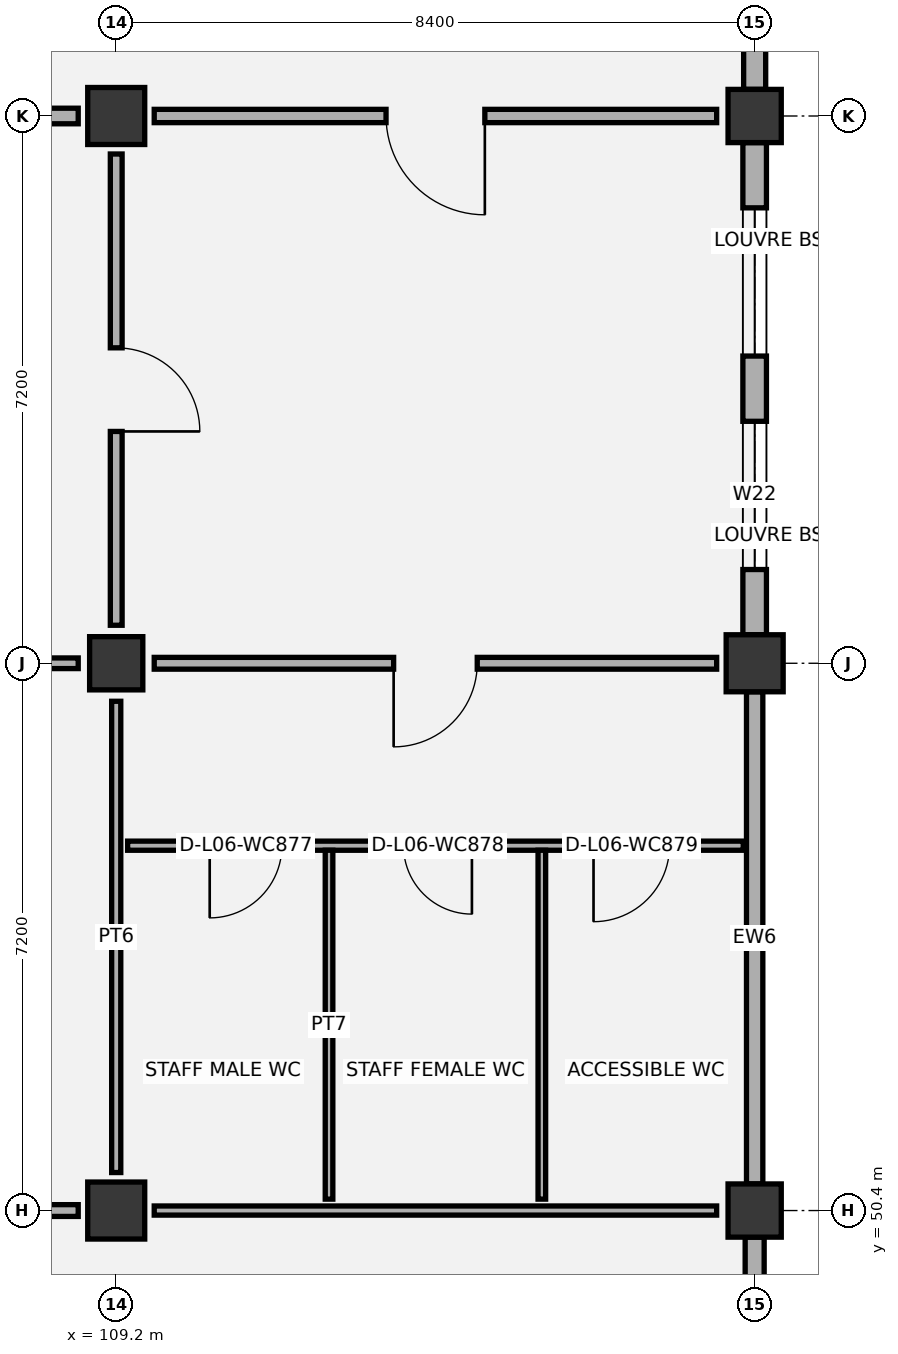
"""IFC4 building model, lengths in metres.
Left out: names, types, materials, properties, quantities, classifications, styles, units other than length and angle.
Written with IfcOpenShell. Run it as: python <this file> out.ifc"""

import sys

from ifc_helpers import new_model, si_unit, direction, frame, frame_2d, origin, origin_2d, place, context, subcontext, project, spatial, rectangle, extrude, element, fill, save


model = new_model("IFC4")
c1 = context("Model", 3, precision=1e-05, world=origin(), true_north=direction((0.0, 1.0)))
c2 = subcontext(c1, "Body", "Model", "MODEL_VIEW")
j1 = project(units=[si_unit("LENGTHUNIT", "METRE"), si_unit("PLANEANGLEUNIT", "RADIAN")], contexts=[c1])
p1 = place(None, origin())
s1 = spatial("IfcSite", under=j1, at=p1, CompositionType="ELEMENT")
p2 = place(p1, origin())
s2 = spatial("IfcBuilding", under=s1, at=p2, CompositionType="ELEMENT")
p3 = place(p2, frame((0.0, 0.0, 31.2)))
s3 = spatial("IfcBuildingStorey", under=s2, at=p3, CompositionType="ELEMENT", Elevation=31.2)
p4 = place(p3, frame((109.2, 50.4, 0.0), z_axis=(0.0, 0.0, 1.0), x_axis=(1.0, 0.0, 0.0)))
e1 = element("IfcColumn", 1, at=p4, inside=s3, PredefinedType="COLUMN", context=c2, shape_type="SweptSolid", body=[
    extrude(rectangle(XDim=0.75, YDim=0.75, at=origin_2d()), origin(), (0.0, 0.0, 1.0), 4.2),
])
p5 = place(p3, frame((109.2, 57.6, 0.0), z_axis=(0.0, 0.0, 1.0), x_axis=(1.0, 0.0, 0.0)))
e2 = element("IfcColumn", 2, at=p5, inside=s3, PredefinedType="COLUMN", context=c2, shape_type="SweptSolid", body=[
    extrude(rectangle(XDim=0.7, YDim=0.7, at=origin_2d()), origin(), (0.0, 0.0, 1.0), 4.2),
])
p6 = place(p3, frame((109.2, 64.8, 0.0), z_axis=(0.0, 0.0, 1.0), x_axis=(1.0, 0.0, 0.0)))
e3 = element("IfcColumn", 3, at=p6, inside=s3, PredefinedType="COLUMN", context=c2, shape_type="SweptSolid", body=[
    extrude(rectangle(XDim=0.75, YDim=0.75, at=origin_2d()), origin(), (0.0, 0.0, 1.0), 4.2),
])
p7 = place(p3, frame((117.6, 50.4, 0.0), z_axis=(0.0, 0.0, 1.0), x_axis=(1.0, 0.0, 0.0)))
e4 = element("IfcColumn", 4, at=p7, inside=s3, PredefinedType="COLUMN", context=c2, shape_type="SweptSolid", body=[
    extrude(rectangle(XDim=0.7, YDim=0.7, at=origin_2d()), origin(), (0.0, 0.0, 1.0), 4.2),
])
p8 = place(p3, frame((117.6, 57.6, 0.0), z_axis=(0.0, 0.0, 1.0), x_axis=(1.0, 0.0, 0.0)))
e5 = element("IfcColumn", 5, at=p8, inside=s3, PredefinedType="COLUMN", context=c2, shape_type="SweptSolid", body=[
    extrude(rectangle(XDim=0.75, YDim=0.75, at=origin_2d()), origin(), (0.0, 0.0, 1.0), 4.2),
])
p9 = place(p3, frame((117.6, 64.8, 0.0), z_axis=(0.0, 0.0, 1.0), x_axis=(1.0, 0.0, 0.0)))
e6 = element("IfcColumn", 6, at=p9, inside=s3, PredefinedType="COLUMN", context=c2, shape_type="SweptSolid", body=[
    extrude(rectangle(XDim=0.7, YDim=0.7, at=origin_2d()), origin(), (0.0, 0.0, 1.0), 4.2),
])
p10 = place(p3, frame((117.6, 43.575, 0.0), z_axis=(0.0, 0.0, 1.0), x_axis=(0.0, 1.0, 0.0)))
e7 = element("IfcWall", 7, at=p10, inside=s3, PredefinedType="SOLIDWALL", context=c2, shape_type="SweptSolid", body=[
    extrude(rectangle(XDim=6.475, YDim=0.25, at=frame_2d((3.238, 0.0))), origin(), (0.0, 0.0, 1.0), 3.445),
])
p11 = place(p10, frame((1.558, 0.0, 0.9)))
e8 = element("IfcOpeningElement", 8, at=p11, cuts=e7, PredefinedType="OPENING", context=c2, shape_type="SweptSolid", body=[
    extrude(rectangle(XDim=0.9, YDim=1.8, at=frame_2d((0.45, 0.9))), frame((0.0, 0.135, 0.0), z_axis=(0.0, -1.0, 0.0), x_axis=(1.0, 0.0, 0.0)), (0.0, 0.0, 1.0), 0.27),
])
p12 = place(p10, frame((4.017, 0.0, 0.9)))
e9 = element("IfcOpeningElement", 9, at=p12, cuts=e7, PredefinedType="OPENING", context=c2, shape_type="SweptSolid", body=[
    extrude(rectangle(XDim=0.9, YDim=1.8, at=frame_2d((0.45, 0.9))), frame((0.0, 0.135, 0.0), z_axis=(0.0, -1.0, 0.0), x_axis=(1.0, 0.0, 0.0)), (0.0, 0.0, 1.0), 0.27),
])
p13 = place(p3, frame((117.6, 50.75, 0.0), z_axis=(0.0, 0.0, 1.0), x_axis=(0.0, 1.0, 0.0)))
e10 = element("IfcWall", 10, at=p13, inside=s3, PredefinedType="SOLIDWALL", context=c2, shape_type="SweptSolid", body=[
    extrude(rectangle(XDim=6.475, YDim=0.215, at=frame_2d((3.238, 0.0))), origin(), (0.0, 0.0, 1.0), 3.365),
])
p14 = place(p3, frame((117.6, 57.975, 0.0), z_axis=(0.0, 0.0, 1.0), x_axis=(0.0, 1.0, 0.0)))
e11 = element("IfcWall", 11, at=p14, inside=s3, PredefinedType="SOLIDWALL", context=c2, shape_type="SweptSolid", body=[
    extrude(rectangle(XDim=6.475, YDim=0.31, at=frame_2d((3.237, 0.0))), origin(), (0.0, 0.0, 1.0), 3.365),
])
p15 = place(p14, frame((0.858, 0.0, 0.9)))
e12 = element("IfcOpeningElement", 12, at=p15, cuts=e11, PredefinedType="OPENING", context=c2, shape_type="SweptSolid", body=[
    extrude(rectangle(XDim=1.95, YDim=1.95, at=frame_2d((0.975, 0.975))), frame((0.0, 0.165, 0.0), z_axis=(0.0, -1.0, 0.0), x_axis=(1.0, 0.0, 0.0)), (0.0, 0.0, 1.0), 0.33),
])
p16 = place(p14, frame((3.667, 0.0, 0.9)))
e13 = element("IfcOpeningElement", 13, at=p16, cuts=e11, PredefinedType="OPENING", context=c2, shape_type="SweptSolid", body=[
    extrude(rectangle(XDim=1.95, YDim=1.95, at=frame_2d((0.975, 0.975))), frame((0.0, 0.165, 0.0), z_axis=(0.0, -1.0, 0.0), x_axis=(1.0, 0.0, 0.0)), (0.0, 0.0, 1.0), 0.33),
])
p17 = place(p3, frame((117.6, 65.15, 0.0), z_axis=(0.0, 0.0, 1.0), x_axis=(0.0, 1.0, 0.0)))
e14 = element("IfcWall", 14, at=p17, inside=s3, PredefinedType="SOLIDWALL", context=c2, shape_type="SweptSolid", body=[
    extrude(rectangle(XDim=6.475, YDim=0.29, at=frame_2d((3.238, 0.0))), origin(), (0.0, 0.0, 1.0), 3.365),
])
p18 = place(p17, frame((1.358, 0.0, 0.9)))
e15 = element("IfcOpeningElement", 15, at=p18, cuts=e14, PredefinedType="OPENING", context=c2, shape_type="SweptSolid", body=[
    extrude(rectangle(XDim=1.2, YDim=1.8, at=frame_2d((0.6, 0.9))), frame((0.0, 0.155, 0.0), z_axis=(0.0, -1.0, 0.0), x_axis=(1.0, 0.0, 0.0)), (0.0, 0.0, 1.0), 0.31),
])
p19 = place(p17, frame((3.917, 0.0, 0.9)))
e16 = element("IfcOpeningElement", 16, at=p19, cuts=e14, PredefinedType="OPENING", context=c2, shape_type="SweptSolid", body=[
    extrude(rectangle(XDim=1.2, YDim=1.8, at=frame_2d((0.6, 0.9))), frame((0.0, 0.155, 0.0), z_axis=(0.0, -1.0, 0.0), x_axis=(1.0, 0.0, 0.0)), (0.0, 0.0, 1.0), 0.31),
])
p20 = place(p3, frame((109.35, 55.2, 0.0), z_axis=(0.0, 0.0, 1.0), x_axis=(1.0, 0.0, 0.0)))
e17 = element("IfcWall", 17, at=p20, inside=s3, PredefinedType="PARTITIONING", context=c2, shape_type="SweptSolid", body=[
    extrude(rectangle(XDim=8.1, YDim=0.12, at=frame_2d((4.05, 0.0))), origin(), (0.0, 0.0, 1.0), 3.92),
])
p21 = place(p20, frame((1.08, 0.0, 0.0)))
e18 = element("IfcOpeningElement", 18, at=p21, cuts=e17, PredefinedType="OPENING", context=c2, shape_type="SweptSolid", body=[
    extrude(rectangle(XDim=0.95, YDim=2.1, at=frame_2d((0.475, 1.05))), frame((0.0, 0.07, 0.0), z_axis=(0.0, -1.0, 0.0), x_axis=(1.0, 0.0, 0.0)), (0.0, 0.0, 1.0), 0.14),
])
p22 = place(p20, frame((3.63, 0.0, 0.0)))
e19 = element("IfcOpeningElement", 19, at=p22, cuts=e17, PredefinedType="OPENING", context=c2, shape_type="SweptSolid", body=[
    extrude(rectangle(XDim=0.9, YDim=2.1, at=frame_2d((0.45, 1.05))), frame((0.0, 0.07, 0.0), z_axis=(0.0, -1.0, 0.0), x_axis=(1.0, 0.0, 0.0)), (0.0, 0.0, 1.0), 0.14),
])
p23 = place(p20, frame((6.13, 0.0, 0.0)))
e20 = element("IfcOpeningElement", 20, at=p23, cuts=e17, PredefinedType="OPENING", context=c2, shape_type="SweptSolid", body=[
    extrude(rectangle(XDim=1.0, YDim=2.1, at=frame_2d((0.5, 1.05))), frame((0.0, 0.07, 0.0), z_axis=(0.0, -1.0, 0.0), x_axis=(1.0, 0.0, 0.0)), (0.0, 0.0, 1.0), 0.14),
])
for number, where, z_axis, x_axis in (
    (21, (112.0, 50.55, 0.0), (0.0, 0.0, 1.0), (0.0, 1.0, 0.0)),
    (22, (114.8, 50.55, 0.0), (0.0, 0.0, 1.0), (0.0, 1.0, 0.0)),
):
    element("IfcWall", number, at=place(p3, frame(where, z_axis=z_axis, x_axis=x_axis)), inside=s3, PredefinedType="PARTITIONING", context=c2, shape_type="SweptSolid", body=[
        extrude(rectangle(XDim=4.59, YDim=0.1, at=frame_2d((2.295, 0.0))), origin(), (0.0, 0.0, 1.0), 3.92),
    ])
p24 = place(p3, frame((101.3, 50.4, 0.0), z_axis=(0.0, 0.0, 1.0), x_axis=(1.0, 0.0, 0.0)))
e23 = element("IfcWall", 23, at=p24, inside=s3, PredefinedType="PARTITIONING", context=c2, shape_type="SweptSolid", body=[
    extrude(rectangle(XDim=7.4, YDim=0.155, at=frame_2d((3.7, 0.0))), origin(), (0.0, 0.0, 1.0), 3.265),
])
p25 = place(p24, frame((3.15, 0.0, 0.0)))
e24 = element("IfcOpeningElement", 24, at=p25, cuts=e23, PredefinedType="OPENING", context=c2, shape_type="SweptSolid", body=[
    extrude(rectangle(XDim=1.1, YDim=2.1, at=frame_2d((0.55, 1.05))), frame((0.0, 0.087, 0.0), z_axis=(0.0, -1.0, 0.0), x_axis=(1.0, 0.0, 0.0)), (0.0, 0.0, 1.0), 0.175),
])
p26 = place(p3, frame((109.2, 50.9, 0.0), z_axis=(0.0, 0.0, 1.0), x_axis=(0.0, 1.0, 0.0)))
e25 = element("IfcWall", 25, at=p26, inside=s3, PredefinedType="PARTITIONING", context=c2, shape_type="SweptSolid", body=[
    extrude(rectangle(XDim=6.2, YDim=0.12, at=frame_2d((3.1, 0.0))), origin(), (0.0, 0.0, 1.0), 3.625),
])
p27 = place(p3, frame((101.3, 57.6, 0.0), z_axis=(0.0, 0.0, 1.0), x_axis=(1.0, 0.0, 0.0)))
e26 = element("IfcWall", 26, at=p27, inside=s3, PredefinedType="PARTITIONING", context=c2, shape_type="SweptSolid", body=[
    extrude(rectangle(XDim=7.4, YDim=0.14, at=frame_2d((3.7, 0.0))), origin(), (0.0, 0.0, 1.0), 3.265),
])
p28 = place(p27, frame((3.125, 0.0, 0.0)))
e27 = element("IfcOpeningElement", 27, at=p28, cuts=e26, PredefinedType="OPENING", context=c2, shape_type="SweptSolid", body=[
    extrude(rectangle(XDim=1.15, YDim=2.1, at=frame_2d((0.575, 1.05))), frame((0.0, 0.08, 0.0), z_axis=(0.0, -1.0, 0.0), x_axis=(1.0, 0.0, 0.0)), (0.0, 0.0, 1.0), 0.16),
])
p29 = place(p3, frame((109.2, 58.1, 0.0), z_axis=(0.0, 0.0, 1.0), x_axis=(0.0, 1.0, 0.0)))
e28 = element("IfcWall", 28, at=p29, inside=s3, PredefinedType="PARTITIONING", context=c2, shape_type="SweptSolid", body=[
    extrude(rectangle(XDim=6.2, YDim=0.155, at=frame_2d((3.1, 0.0))), origin(), (0.0, 0.0, 1.0), 3.315),
])
p30 = place(p29, frame((2.55, 0.0, 0.0)))
e29 = element("IfcOpeningElement", 29, at=p30, cuts=e28, PredefinedType="OPENING", context=c2, shape_type="SweptSolid", body=[
    extrude(rectangle(XDim=1.1, YDim=2.1, at=frame_2d((0.55, 1.05))), frame((0.0, 0.087, 0.0), z_axis=(0.0, -1.0, 0.0), x_axis=(1.0, 0.0, 0.0)), (0.0, 0.0, 1.0), 0.175),
])
p31 = place(p3, frame((101.3, 64.8, 0.0), z_axis=(0.0, 0.0, 1.0), x_axis=(1.0, 0.0, 0.0)))
e30 = element("IfcWall", 30, at=p31, inside=s3, PredefinedType="PARTITIONING", context=c2, shape_type="SweptSolid", body=[
    extrude(rectangle(XDim=7.4, YDim=0.205, at=frame_2d((3.7, 0.0))), origin(), (0.0, 0.0, 1.0), 3.265),
])
p32 = place(p31, frame((3.075, 0.0, 0.0)))
e31 = element("IfcOpeningElement", 31, at=p32, cuts=e30, PredefinedType="OPENING", context=c2, shape_type="SweptSolid", body=[
    extrude(rectangle(XDim=1.25, YDim=2.1, at=frame_2d((0.625, 1.05))), frame((0.0, 0.113, 0.0), z_axis=(0.0, -1.0, 0.0), x_axis=(1.0, 0.0, 0.0)), (0.0, 0.0, 1.0), 0.225),
])
p33 = place(p3, frame((109.7, 50.4, 0.0), z_axis=(0.0, 0.0, 1.0), x_axis=(1.0, 0.0, 0.0)))
e32 = element("IfcWall", 32, at=p33, inside=s3, PredefinedType="PARTITIONING", context=c2, shape_type="SweptSolid", body=[
    extrude(rectangle(XDim=7.4, YDim=0.12, at=frame_2d((3.7, 0.0))), origin(), (0.0, 0.0, 1.0), 3.265),
])
p34 = place(p3, frame((109.7, 57.6, 0.0), z_axis=(0.0, 0.0, 1.0), x_axis=(1.0, 0.0, 0.0)))
e33 = element("IfcWall", 33, at=p34, inside=s3, PredefinedType="PARTITIONING", context=c2, shape_type="SweptSolid", body=[
    extrude(rectangle(XDim=7.4, YDim=0.155, at=frame_2d((3.7, 0.0))), origin(), (0.0, 0.0, 1.0), 3.265),
])
p35 = place(p34, frame((3.15, 0.0, 0.0)))
e34 = element("IfcOpeningElement", 34, at=p35, cuts=e33, PredefinedType="OPENING", context=c2, shape_type="SweptSolid", body=[
    extrude(rectangle(XDim=1.1, YDim=2.1, at=frame_2d((0.55, 1.05))), frame((0.0, 0.087, 0.0), z_axis=(0.0, -1.0, 0.0), x_axis=(1.0, 0.0, 0.0)), (0.0, 0.0, 1.0), 0.175),
])
p36 = place(p3, frame((109.7, 64.8, 0.0), z_axis=(0.0, 0.0, 1.0), x_axis=(1.0, 0.0, 0.0)))
e35 = element("IfcWall", 35, at=p36, inside=s3, PredefinedType="PARTITIONING", context=c2, shape_type="SweptSolid", body=[
    extrude(rectangle(XDim=7.4, YDim=0.175, at=frame_2d((3.7, 0.0))), origin(), (0.0, 0.0, 1.0), 3.265),
])
p37 = place(p36, frame((3.05, 0.0, 0.0)))
e36 = element("IfcOpeningElement", 36, at=p37, cuts=e35, PredefinedType="OPENING", context=c2, shape_type="SweptSolid", body=[
    extrude(rectangle(XDim=1.3, YDim=2.15, at=frame_2d((0.65, 1.075))), frame((0.0, 0.097, 0.0), z_axis=(0.0, -1.0, 0.0), x_axis=(1.0, 0.0, 0.0)), (0.0, 0.0, 1.0), 0.195),
])
p38 = place(p15, origin())
e37 = element("IfcWindow", 37, at=p38, inside=s3, PartitioningType="SINGLE_PANEL", PredefinedType="WINDOW", context=c2, shape_type="SweptSolid", body=[
    extrude(rectangle(XDim=1.95, YDim=1.95, at=frame_2d((0.975, 0.975))), frame((0.0, 0.03, 0.0), z_axis=(0.0, -1.0, 0.0), x_axis=(1.0, 0.0, 0.0)), (0.0, 0.0, 1.0), 0.06),
])
fill(e12, e37)
p39 = place(p16, origin())
e38 = element("IfcWindow", 38, at=p39, inside=s3, PartitioningType="SINGLE_PANEL", PredefinedType="WINDOW", context=c2, shape_type="SweptSolid", body=[
    extrude(rectangle(XDim=1.95, YDim=1.95, at=frame_2d((0.975, 0.975))), frame((0.0, 0.03, 0.0), z_axis=(0.0, -1.0, 0.0), x_axis=(1.0, 0.0, 0.0)), (0.0, 0.0, 1.0), 0.06),
])
fill(e13, e38)
p40 = place(p21, frame((0.95, 0.0, 0.0), z_axis=(0.0, 0.0, 1.0), x_axis=(-1.0, 0.0, 0.0)))
e39 = element("IfcDoor", 39, at=p40, inside=s3, OperationType="SINGLE_SWING_RIGHT", PredefinedType="DOOR", context=c2, shape_type="SweptSolid", body=[
    extrude(rectangle(XDim=0.95, YDim=2.1, at=frame_2d((0.475, 1.05))), frame((0.0, 0.025, 0.0), z_axis=(0.0, -1.0, 0.0), x_axis=(1.0, 0.0, 0.0)), (0.0, 0.0, 1.0), 0.05),
])
fill(e18, e39)
p41 = place(p22, frame((0.9, 0.0, 0.0), z_axis=(0.0, 0.0, 1.0), x_axis=(-1.0, 0.0, 0.0)))
e40 = element("IfcDoor", 40, at=p41, inside=s3, OperationType="SINGLE_SWING_LEFT", PredefinedType="DOOR", context=c2, shape_type="SweptSolid", body=[
    extrude(rectangle(XDim=0.9, YDim=2.1, at=frame_2d((0.45, 1.05))), frame((0.0, 0.025, 0.0), z_axis=(0.0, -1.0, 0.0), x_axis=(1.0, 0.0, 0.0)), (0.0, 0.0, 1.0), 0.05),
])
fill(e19, e40)
p42 = place(p23, frame((1.0, 0.0, 0.0), z_axis=(0.0, 0.0, 1.0), x_axis=(-1.0, 0.0, 0.0)))
e41 = element("IfcDoor", 41, at=p42, inside=s3, OperationType="SINGLE_SWING_RIGHT", PredefinedType="DOOR", context=c2, shape_type="SweptSolid", body=[
    extrude(rectangle(XDim=1.0, YDim=2.1, at=frame_2d((0.5, 1.05))), frame((0.0, 0.025, 0.0), z_axis=(0.0, -1.0, 0.0), x_axis=(1.0, 0.0, 0.0)), (0.0, 0.0, 1.0), 0.05),
])
fill(e20, e41)
p43 = place(p30, frame((1.1, 0.0, 0.0), z_axis=(0.0, 0.0, 1.0), x_axis=(-1.0, 0.0, 0.0)))
e42 = element("IfcDoor", 42, at=p43, inside=s3, OperationType="SINGLE_SWING_RIGHT", PredefinedType="DOOR", context=c2, shape_type="SweptSolid", body=[
    extrude(rectangle(XDim=1.1, YDim=2.1, at=frame_2d((0.55, 1.05))), frame((0.0, 0.025, 0.0), z_axis=(0.0, -1.0, 0.0), x_axis=(1.0, 0.0, 0.0)), (0.0, 0.0, 1.0), 0.05),
])
fill(e29, e42)
p44 = place(p35, frame((1.1, 0.0, 0.0), z_axis=(0.0, 0.0, 1.0), x_axis=(-1.0, 0.0, 0.0)))
e43 = element("IfcDoor", 43, at=p44, inside=s3, OperationType="SINGLE_SWING_RIGHT", PredefinedType="DOOR", context=c2, shape_type="SweptSolid", body=[
    extrude(rectangle(XDim=1.1, YDim=2.1, at=frame_2d((0.55, 1.05))), frame((0.0, 0.025, 0.0), z_axis=(0.0, -1.0, 0.0), x_axis=(1.0, 0.0, 0.0)), (0.0, 0.0, 1.0), 0.05),
])
fill(e34, e43)
p45 = place(p37, frame((1.3, 0.0, 0.0), z_axis=(0.0, 0.0, 1.0), x_axis=(-1.0, 0.0, 0.0)))
e44 = element("IfcDoor", 44, at=p45, inside=s3, OperationType="SINGLE_SWING_LEFT", PredefinedType="DOOR", context=c2, shape_type="SweptSolid", body=[
    extrude(rectangle(XDim=1.3, YDim=2.15, at=frame_2d((0.65, 1.075))), frame((0.0, 0.025, 0.0), z_axis=(0.0, -1.0, 0.0), x_axis=(1.0, 0.0, 0.0)), (0.0, 0.0, 1.0), 0.05),
])
fill(e36, e44)
save(model, sys.argv[1])
